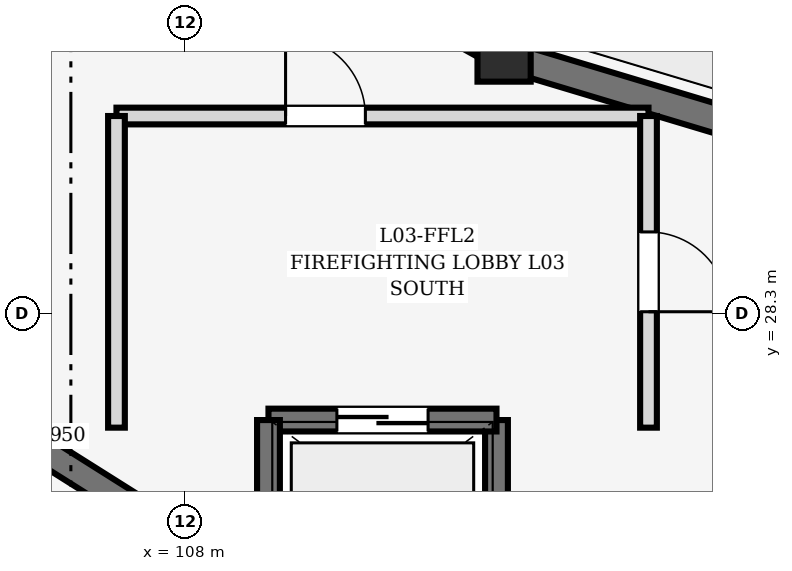
"""IFC4 building model, lengths in metres.
Left out: names, types, materials, properties, quantities, classifications, styles, units other than length and angle.
Written with IfcOpenShell. Run it as: python <this file> out.ifc"""

import sys

from ifc_helpers import new_model, si_unit, direction, frame, frame_2d, origin, origin_2d, place, context, subcontext, project, spatial, rectangle, extrude, element, fill, save


model = new_model("IFC4")
c1 = context("Model", 3, precision=1e-05, world=origin(), true_north=direction((0.0, 1.0)))
c2 = subcontext(c1, "Body", "Model", "MODEL_VIEW")
j1 = project(units=[si_unit("LENGTHUNIT", "METRE"), si_unit("PLANEANGLEUNIT", "RADIAN")], contexts=[c1])
p1 = place(None, origin())
s1 = spatial("IfcSite", under=j1, at=p1, CompositionType="ELEMENT")
p2 = place(p1, origin())
s2 = spatial("IfcBuilding", under=s1, at=p2, CompositionType="ELEMENT")
p3 = place(p2, frame((0.0, 0.0, 10.2)))
s3 = spatial("IfcBuildingStorey", under=s2, at=p3, CompositionType="ELEMENT", Elevation=10.2)
p4 = place(p3, frame((112.2, 31.702, 0.0), z_axis=(0.0, 0.0, 1.0), x_axis=(1.0, 0.0, 0.0)))
e1 = element("IfcColumn", 1, at=p4, inside=s3, PredefinedType="COLUMN", context=c2, shape_type="SweptSolid", body=[
    extrude(rectangle(XDim=0.7, YDim=0.7, at=origin_2d()), origin(), (0.0, 0.0, 1.0), 4.5),
])
p5 = place(p3, frame((108.39, 33.821, 0.0), z_axis=(0.0, 0.0, 1.0), x_axis=(0.87401308715, -0.485902380618, 0.0)))
e2 = element("IfcWall", 2, at=p5, inside=s3, PredefinedType="SOLIDWALL", context=c2, shape_type="SweptSolid", body=[
    extrude(rectangle(XDim=4.074, YDim=0.38, at=frame_2d((2.037, 0.0))), origin(), (0.0, 0.0, 1.0), 4.24),
])
p6 = place(p3, frame((103.312, 28.279, 0.0), z_axis=(0.0, 0.0, 1.0), x_axis=(0.846132783073, -0.532972150688, 0.0)))
e3 = element("IfcWall", 3, at=p6, inside=s3, PredefinedType="SHEAR", context=c2, shape_type="SweptSolid", body=[
    extrude(rectangle(XDim=5.95, YDim=0.35, at=frame_2d((2.975, 0.0))), origin(), (0.0, 0.0, 1.0), 4.24),
])
p7 = place(p3, frame((112.473, 31.621, 0.0), z_axis=(0.0, 0.0, 1.0), x_axis=(0.957792414988, -0.287460762177, 0.0)))
e4 = element("IfcWall", 4, at=p7, inside=s3, PredefinedType="SOLIDWALL", context=c2, shape_type="SweptSolid", body=[
    extrude(rectangle(XDim=4.365, YDim=0.38, at=frame_2d((2.183, 0.0))), origin(), (0.0, 0.0, 1.0), 4.24),
])
p8 = place(p3, frame((112.1, 26.9, 0.0), z_axis=(0.0, 0.0, 1.0), x_axis=(0.0, -1.0, 0.0)))
e5 = element("IfcWall", 5, at=p8, inside=s3, PredefinedType="SHEAR", context=c2, shape_type="SweptSolid", body=[
    extrude(rectangle(XDim=2.2, YDim=0.3, at=frame_2d((1.1, 0.0))), origin(), (0.0, 0.0, 1.0), 4.25),
])
p9 = place(p3, frame((109.1, 26.9, 0.0), z_axis=(0.0, 0.0, 1.0), x_axis=(1.0, 0.0, 0.0)))
e6 = element("IfcWall", 6, at=p9, inside=s3, PredefinedType="SHEAR", context=c2, shape_type="SweptSolid", body=[
    extrude(rectangle(XDim=3.0, YDim=0.3, at=frame_2d((1.5, 0.0))), origin(), (0.0, 0.0, 1.0), 4.25),
])
p10 = place(p9, frame((0.9, 0.0, 0.0)))
e7 = element("IfcOpeningElement", 7, at=p10, cuts=e6, PredefinedType="OPENING", context=c2, shape_type="SweptSolid", body=[
    extrude(rectangle(XDim=1.2, YDim=2.15, at=frame_2d((0.6, 1.075))), frame((0.0, 0.162, 0.0), z_axis=(0.0, -1.0, 0.0), x_axis=(1.0, 0.0, 0.0)), (0.0, 0.0, 1.0), 0.324),
])
p11 = place(p3, frame((109.1, 24.7, 0.0), z_axis=(0.0, 0.0, 1.0), x_axis=(0.0, 1.0, 0.0)))
e8 = element("IfcWall", 8, at=p11, inside=s3, PredefinedType="SHEAR", context=c2, shape_type="SweptSolid", body=[
    extrude(rectangle(XDim=2.2, YDim=0.3, at=frame_2d((1.1, 0.0))), origin(), (0.0, 0.0, 1.0), 4.24),
])
p12 = place(p3, frame((107.1, 30.9, 0.0), z_axis=(0.0, 0.0, 1.0), x_axis=(1.0, 0.0, 0.0)))
e9 = element("IfcWall", 9, at=p12, inside=s3, PredefinedType="SOLIDWALL", context=c2, shape_type="SweptSolid", body=[
    extrude(rectangle(XDim=7.0, YDim=0.22, at=frame_2d((3.5, 0.0))), origin(), (0.0, 0.0, 1.0), 4.235),
])
p13 = place(p12, frame((2.225, 0.0, 0.0)))
e10 = element("IfcOpeningElement", 10, at=p13, cuts=e9, PredefinedType="OPENING", context=c2, shape_type="SweptSolid", body=[
    extrude(rectangle(XDim=1.05, YDim=2.15, at=frame_2d((0.525, 1.075))), frame((0.0, 0.122, 0.0), z_axis=(0.0, -1.0, 0.0), x_axis=(1.0, 0.0, 0.0)), (0.0, 0.0, 1.0), 0.244),
])
p14 = place(p3, frame((107.1, 26.8, 0.0), z_axis=(0.0, 0.0, 1.0), x_axis=(0.0, 1.0, 0.0)))
e11 = element("IfcWall", 11, at=p14, inside=s3, PredefinedType="SOLIDWALL", context=c2, shape_type="SweptSolid", body=[
    extrude(rectangle(XDim=4.1, YDim=0.22, at=frame_2d((2.05, 0.0))), origin(), (0.0, 0.0, 1.0), 4.235),
])
p15 = place(p3, frame((114.1, 30.9, 0.0), z_axis=(0.0, 0.0, 1.0), x_axis=(0.0, -1.0, 0.0)))
e12 = element("IfcWall", 12, at=p15, inside=s3, PredefinedType="SOLIDWALL", context=c2, shape_type="SweptSolid", body=[
    extrude(rectangle(XDim=4.1, YDim=0.22, at=frame_2d((2.05, 0.0))), origin(), (0.0, 0.0, 1.0), 4.235),
])
p16 = place(p15, frame((1.525, 0.0, 0.0)))
e13 = element("IfcOpeningElement", 13, at=p16, cuts=e12, PredefinedType="OPENING", context=c2, shape_type="SweptSolid", body=[
    extrude(rectangle(XDim=1.05, YDim=2.15, at=frame_2d((0.525, 1.075))), frame((0.0, 0.122, 0.0), z_axis=(0.0, -1.0, 0.0), x_axis=(1.0, 0.0, 0.0)), (0.0, 0.0, 1.0), 0.244),
])
p17 = place(p10, origin())
e14 = element("IfcDoor", 14, at=p17, inside=s3, OperationType="DOUBLE_DOOR_SLIDING", PredefinedType="DOOR", context=c2, shape_type="SweptSolid", body=[
    extrude(rectangle(XDim=1.2, YDim=2.15, at=frame_2d((0.6, 1.075))), frame((0.0, 0.025, 0.0), z_axis=(0.0, -1.0, 0.0), x_axis=(1.0, 0.0, 0.0)), (0.0, 0.0, 1.0), 0.05),
])
fill(e7, e14)
p18 = place(p13, origin())
e15 = element("IfcDoor", 15, at=p18, inside=s3, OperationType="SINGLE_SWING_LEFT", PredefinedType="DOOR", context=c2, shape_type="SweptSolid", body=[
    extrude(rectangle(XDim=1.05, YDim=2.15, at=frame_2d((0.525, 1.075))), frame((0.0, 0.025, 0.0), z_axis=(0.0, -1.0, 0.0), x_axis=(1.0, 0.0, 0.0)), (0.0, 0.0, 1.0), 0.05),
])
fill(e10, e15)
p19 = place(p16, origin())
e16 = element("IfcDoor", 16, at=p19, inside=s3, OperationType="SINGLE_SWING_RIGHT", PredefinedType="DOOR", context=c2, shape_type="SweptSolid", body=[
    extrude(rectangle(XDim=1.05, YDim=2.15, at=frame_2d((0.525, 1.075))), frame((0.0, 0.025, 0.0), z_axis=(0.0, -1.0, 0.0), x_axis=(1.0, 0.0, 0.0)), (0.0, 0.0, 1.0), 0.05),
])
fill(e13, e16)
save(model, sys.argv[1])
